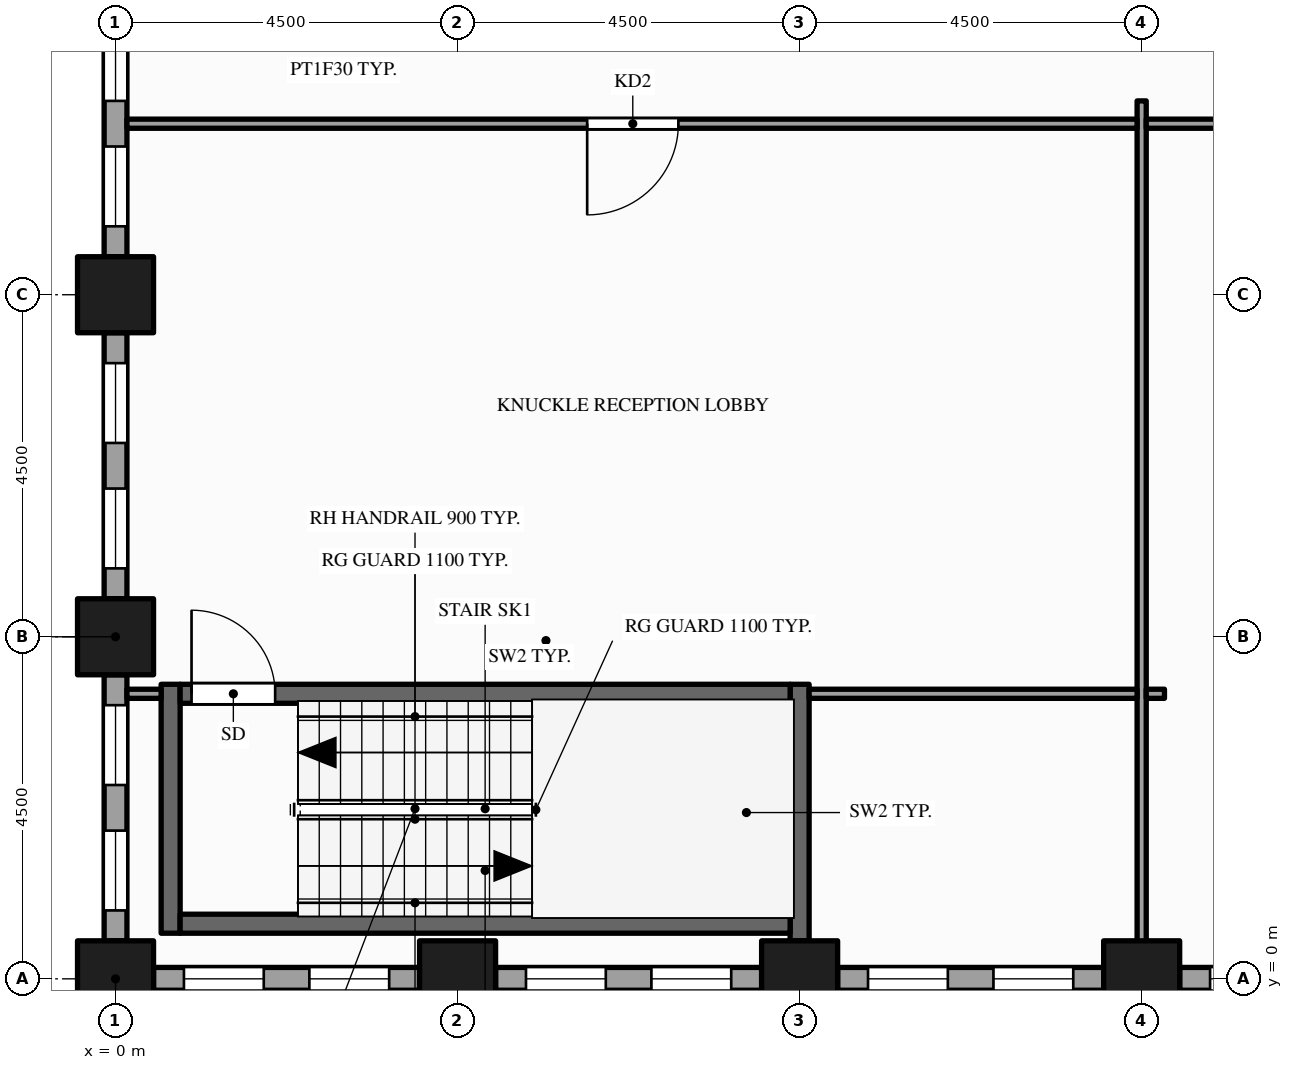
"""IFC4 building model, lengths in metres.
Left out: names, types, materials, properties, quantities, classifications, styles, units other than length and angle.
Written with IfcOpenShell. Run it as: python <this file> out.ifc"""

import sys

from ifc_helpers import new_model, si_unit, direction, frame, frame_2d, origin, origin_2d, place, context, subcontext, project, spatial, rectangle, hollow_rectangle, extrude, element, fill, save


model = new_model("IFC4")
c1 = context("Model", 3, precision=1e-05, world=origin(), true_north=direction((0.0, 1.0)))
c2 = subcontext(c1, "Body", "Model", "MODEL_VIEW")
j1 = project(units=[si_unit("LENGTHUNIT", "METRE"), si_unit("PLANEANGLEUNIT", "RADIAN")], contexts=[c1])
p1 = place(None, origin())
s1 = spatial("IfcSite", under=j1, at=p1, CompositionType="ELEMENT")
p2 = place(p1, origin())
s2 = spatial("IfcBuilding", under=s1, at=p2, CompositionType="ELEMENT")
p3 = place(p2, frame((0.0, 0.0, 127.0)))
s3 = spatial("IfcBuildingStorey", under=s2, at=p3, CompositionType="ELEMENT", Elevation=127.0)
for number, where, z_axis, x_axis in (
    (1, (0.0, 0.0, -0.15), (0.0, 0.0, 1.0), (1.0, 0.0, 0.0)),
    (2, (0.0, 4.5, -0.15), (0.0, 0.0, 1.0), (1.0, 0.0, 0.0)),
    (3, (0.0, 9.0, -0.15), (0.0, 0.0, 1.0), (1.0, 0.0, 0.0)),
    (4, (4.5, 0.0, -0.15), (0.0, 0.0, 1.0), (1.0, 0.0, 0.0)),
    (5, (9.0, 0.0, -0.15), (0.0, 0.0, 1.0), (1.0, 0.0, 0.0)),
    (6, (13.5, 0.0, -0.15), (0.0, 0.0, 1.0), (1.0, 0.0, 0.0)),
):
    element("IfcColumn", number, at=place(p3, frame(where, z_axis=z_axis, x_axis=x_axis)), inside=s3, PredefinedType="COLUMN", context=c2, shape_type="SweptSolid", body=[
        extrude(hollow_rectangle(XDim=1.0, YDim=1.0, WallThickness=0.05, at=origin_2d()), origin(), (0.0, 0.0, 1.0), 3.9),
    ])
p4 = place(p3, frame((0.0, 13.0, 0.0), z_axis=(0.0, 0.0, 1.0), x_axis=(0.0, -1.0, 0.0)))
e7 = element("IfcWall", 7, at=p4, inside=s3, PredefinedType="STANDARD", context=c2, shape_type="SweptSolid", body=[
    extrude(rectangle(XDim=3.5, YDim=0.3, at=frame_2d((1.75, 0.0))), origin(), (0.0, 0.0, 1.0), 3.054),
])
p5 = place(p4, frame((0.4, 0.0, 0.9)))
e8 = element("IfcOpeningElement", 8, at=p5, cuts=e7, PredefinedType="OPENING", context=c2, shape_type="SweptSolid", body=[
    extrude(rectangle(XDim=1.05, YDim=2.0, at=frame_2d((0.525, 1.0))), frame((0.0, 0.16, 0.0), z_axis=(0.0, -1.0, 0.0), x_axis=(1.0, 0.0, 0.0)), (0.0, 0.0, 1.0), 0.32),
])
p6 = place(p4, frame((2.05, 0.0, 0.9)))
e9 = element("IfcOpeningElement", 9, at=p6, cuts=e7, PredefinedType="OPENING", context=c2, shape_type="SweptSolid", body=[
    extrude(rectangle(XDim=1.05, YDim=2.0, at=frame_2d((0.525, 1.0))), frame((0.0, 0.16, 0.0), z_axis=(0.0, -1.0, 0.0), x_axis=(1.0, 0.0, 0.0)), (0.0, 0.0, 1.0), 0.32),
])
p7 = place(p3, frame((0.0, 8.5, 0.0), z_axis=(0.0, 0.0, 1.0), x_axis=(0.0, -1.0, 0.0)))
e10 = element("IfcWall", 10, at=p7, inside=s3, PredefinedType="STANDARD", context=c2, shape_type="SweptSolid", body=[
    extrude(rectangle(XDim=3.5, YDim=0.3, at=frame_2d((1.75, 0.0))), origin(), (0.0, 0.0, 1.0), 3.054),
])
p8 = place(p7, frame((0.4, 0.0, 0.9)))
e11 = element("IfcOpeningElement", 11, at=p8, cuts=e10, PredefinedType="OPENING", context=c2, shape_type="SweptSolid", body=[
    extrude(rectangle(XDim=1.05, YDim=2.0, at=frame_2d((0.525, 1.0))), frame((0.0, 0.16, 0.0), z_axis=(0.0, -1.0, 0.0), x_axis=(1.0, 0.0, 0.0)), (0.0, 0.0, 1.0), 0.32),
])
p9 = place(p7, frame((2.05, 0.0, 0.9)))
e12 = element("IfcOpeningElement", 12, at=p9, cuts=e10, PredefinedType="OPENING", context=c2, shape_type="SweptSolid", body=[
    extrude(rectangle(XDim=1.05, YDim=2.0, at=frame_2d((0.525, 1.0))), frame((0.0, 0.16, 0.0), z_axis=(0.0, -1.0, 0.0), x_axis=(1.0, 0.0, 0.0)), (0.0, 0.0, 1.0), 0.32),
])
p10 = place(p3, frame((0.0, 4.0, 0.0), z_axis=(0.0, 0.0, 1.0), x_axis=(0.0, -1.0, 0.0)))
e13 = element("IfcWall", 13, at=p10, inside=s3, PredefinedType="STANDARD", context=c2, shape_type="SweptSolid", body=[
    extrude(rectangle(XDim=3.5, YDim=0.3, at=frame_2d((1.75, 0.0))), origin(), (0.0, 0.0, 1.0), 3.054),
])
p11 = place(p10, frame((0.4, 0.0, 0.9)))
e14 = element("IfcOpeningElement", 14, at=p11, cuts=e13, PredefinedType="OPENING", context=c2, shape_type="SweptSolid", body=[
    extrude(rectangle(XDim=1.05, YDim=2.0, at=frame_2d((0.525, 1.0))), frame((0.0, 0.16, 0.0), z_axis=(0.0, -1.0, 0.0), x_axis=(1.0, 0.0, 0.0)), (0.0, 0.0, 1.0), 0.32),
])
p12 = place(p10, frame((2.05, 0.0, 0.9)))
e15 = element("IfcOpeningElement", 15, at=p12, cuts=e13, PredefinedType="OPENING", context=c2, shape_type="SweptSolid", body=[
    extrude(rectangle(XDim=1.05, YDim=2.0, at=frame_2d((0.525, 1.0))), frame((0.0, 0.16, 0.0), z_axis=(0.0, -1.0, 0.0), x_axis=(1.0, 0.0, 0.0)), (0.0, 0.0, 1.0), 0.32),
])
p13 = place(p3, frame((0.5, 0.0, 0.0), z_axis=(0.0, 0.0, 1.0), x_axis=(1.0, 0.0, 0.0)))
e16 = element("IfcWall", 16, at=p13, inside=s3, PredefinedType="STANDARD", context=c2, shape_type="SweptSolid", body=[
    extrude(rectangle(XDim=3.5, YDim=0.3, at=frame_2d((1.75, 0.0))), origin(), (0.0, 0.0, 1.0), 3.054),
])
p14 = place(p13, frame((0.4, 0.0, 0.9)))
e17 = element("IfcOpeningElement", 17, at=p14, cuts=e16, PredefinedType="OPENING", context=c2, shape_type="SweptSolid", body=[
    extrude(rectangle(XDim=1.05, YDim=2.0, at=frame_2d((0.525, 1.0))), frame((0.0, 0.16, 0.0), z_axis=(0.0, -1.0, 0.0), x_axis=(1.0, 0.0, 0.0)), (0.0, 0.0, 1.0), 0.32),
])
p15 = place(p13, frame((2.05, 0.0, 0.9)))
e18 = element("IfcOpeningElement", 18, at=p15, cuts=e16, PredefinedType="OPENING", context=c2, shape_type="SweptSolid", body=[
    extrude(rectangle(XDim=1.05, YDim=2.0, at=frame_2d((0.525, 1.0))), frame((0.0, 0.16, 0.0), z_axis=(0.0, -1.0, 0.0), x_axis=(1.0, 0.0, 0.0)), (0.0, 0.0, 1.0), 0.32),
])
p16 = place(p3, frame((5.0, 0.0, 0.0), z_axis=(0.0, 0.0, 1.0), x_axis=(1.0, 0.0, 0.0)))
e19 = element("IfcWall", 19, at=p16, inside=s3, PredefinedType="STANDARD", context=c2, shape_type="SweptSolid", body=[
    extrude(rectangle(XDim=3.5, YDim=0.3, at=frame_2d((1.75, 0.0))), origin(), (0.0, 0.0, 1.0), 3.054),
])
p17 = place(p16, frame((0.4, 0.0, 0.9)))
e20 = element("IfcOpeningElement", 20, at=p17, cuts=e19, PredefinedType="OPENING", context=c2, shape_type="SweptSolid", body=[
    extrude(rectangle(XDim=1.05, YDim=2.0, at=frame_2d((0.525, 1.0))), frame((0.0, 0.16, 0.0), z_axis=(0.0, -1.0, 0.0), x_axis=(1.0, 0.0, 0.0)), (0.0, 0.0, 1.0), 0.32),
])
p18 = place(p16, frame((2.05, 0.0, 0.9)))
e21 = element("IfcOpeningElement", 21, at=p18, cuts=e19, PredefinedType="OPENING", context=c2, shape_type="SweptSolid", body=[
    extrude(rectangle(XDim=1.05, YDim=2.0, at=frame_2d((0.525, 1.0))), frame((0.0, 0.16, 0.0), z_axis=(0.0, -1.0, 0.0), x_axis=(1.0, 0.0, 0.0)), (0.0, 0.0, 1.0), 0.32),
])
p19 = place(p3, frame((9.5, 0.0, 0.0), z_axis=(0.0, 0.0, 1.0), x_axis=(1.0, 0.0, 0.0)))
e22 = element("IfcWall", 22, at=p19, inside=s3, PredefinedType="STANDARD", context=c2, shape_type="SweptSolid", body=[
    extrude(rectangle(XDim=3.5, YDim=0.3, at=frame_2d((1.75, 0.0))), origin(), (0.0, 0.0, 1.0), 3.054),
])
p20 = place(p19, frame((0.4, 0.0, 0.9)))
e23 = element("IfcOpeningElement", 23, at=p20, cuts=e22, PredefinedType="OPENING", context=c2, shape_type="SweptSolid", body=[
    extrude(rectangle(XDim=1.05, YDim=2.0, at=frame_2d((0.525, 1.0))), frame((0.0, 0.16, 0.0), z_axis=(0.0, -1.0, 0.0), x_axis=(1.0, 0.0, 0.0)), (0.0, 0.0, 1.0), 0.32),
])
p21 = place(p19, frame((2.05, 0.0, 0.9)))
e24 = element("IfcOpeningElement", 24, at=p21, cuts=e22, PredefinedType="OPENING", context=c2, shape_type="SweptSolid", body=[
    extrude(rectangle(XDim=1.05, YDim=2.0, at=frame_2d((0.525, 1.0))), frame((0.0, 0.16, 0.0), z_axis=(0.0, -1.0, 0.0), x_axis=(1.0, 0.0, 0.0)), (0.0, 0.0, 1.0), 0.32),
])
p22 = place(p3, frame((14.0, 0.0, 0.0), z_axis=(0.0, 0.0, 1.0), x_axis=(1.0, 0.0, 0.0)))
e25 = element("IfcWall", 25, at=p22, inside=s3, PredefinedType="STANDARD", context=c2, shape_type="SweptSolid", body=[
    extrude(rectangle(XDim=3.5, YDim=0.3, at=frame_2d((1.75, 0.0))), origin(), (0.0, 0.0, 1.0), 3.054),
])
p23 = place(p22, frame((0.4, 0.0, 0.9)))
e26 = element("IfcOpeningElement", 26, at=p23, cuts=e25, PredefinedType="OPENING", context=c2, shape_type="SweptSolid", body=[
    extrude(rectangle(XDim=1.05, YDim=2.0, at=frame_2d((0.525, 1.0))), frame((0.0, 0.16, 0.0), z_axis=(0.0, -1.0, 0.0), x_axis=(1.0, 0.0, 0.0)), (0.0, 0.0, 1.0), 0.32),
])
p24 = place(p22, frame((2.05, 0.0, 0.9)))
e27 = element("IfcOpeningElement", 27, at=p24, cuts=e25, PredefinedType="OPENING", context=c2, shape_type="SweptSolid", body=[
    extrude(rectangle(XDim=1.05, YDim=2.0, at=frame_2d((0.525, 1.0))), frame((0.0, 0.16, 0.0), z_axis=(0.0, -1.0, 0.0), x_axis=(1.0, 0.0, 0.0)), (0.0, 0.0, 1.0), 0.32),
])
p25 = place(p3, frame((0.725, 0.6, 0.0), z_axis=(0.0, 0.0, 1.0), x_axis=(0.0, 1.0, 0.0)))
e28 = element("IfcWall", 28, at=p25, inside=s3, PredefinedType="SHEAR", context=c2, shape_type="SweptSolid", body=[
    extrude(rectangle(XDim=3.275, YDim=0.25, at=frame_2d((1.637, 0.0))), origin(), (0.0, 0.0, 1.0), 3.75),
])
p26 = place(p3, frame((9.0, 0.5, 0.0), z_axis=(0.0, 0.0, 1.0), x_axis=(0.0, 1.0, 0.0)))
e29 = element("IfcWall", 29, at=p26, inside=s3, PredefinedType="SHEAR", context=c2, shape_type="SweptSolid", body=[
    extrude(rectangle(XDim=3.375, YDim=0.25, at=frame_2d((1.688, 0.0))), origin(), (0.0, 0.0, 1.0), 3.75),
])
p27 = place(p3, frame((13.5, 0.15, 0.0), z_axis=(0.0, 0.0, 1.0), x_axis=(0.0, 1.0, 0.0)))
e30 = element("IfcWall", 30, at=p27, inside=s3, PredefinedType="PARTITIONING", context=c2, shape_type="SweptSolid", body=[
    extrude(rectangle(XDim=11.4, YDim=0.12, at=frame_2d((5.7, 0.0))), origin(), (0.0, 0.0, 1.0), 2.838),
])
p28 = place(p3, frame((0.85, 0.725, 0.0), z_axis=(0.0, 0.0, 1.0), x_axis=(1.0, 0.0, 0.0)))
e31 = element("IfcWall", 31, at=p28, inside=s3, PredefinedType="SHEAR", context=c2, shape_type="SweptSolid", body=[
    extrude(rectangle(XDim=8.025, YDim=0.25, at=frame_2d((4.012, 0.0))), origin(), (0.0, 0.0, 1.0), 3.75),
])
p29 = place(p3, frame((0.15, 3.75, 0.0), z_axis=(0.0, 0.0, 1.0), x_axis=(1.0, 0.0, 0.0)))
e32 = element("IfcWall", 32, at=p29, inside=s3, PredefinedType="PARTITIONING", context=c2, shape_type="SweptSolid", body=[
    extrude(rectangle(XDim=0.45, YDim=0.12, at=frame_2d((0.225, 0.0))), origin(), (0.0, 0.0, 1.0), 3.75),
])
p30 = place(p3, frame((0.85, 3.75, 0.0), z_axis=(0.0, 0.0, 1.0), x_axis=(1.0, 0.0, 0.0)))
e33 = element("IfcWall", 33, at=p30, inside=s3, PredefinedType="SHEAR", context=c2, shape_type="SweptSolid", body=[
    extrude(rectangle(XDim=8.025, YDim=0.25, at=frame_2d((4.012, 0.0))), origin(), (0.0, 0.0, 1.0), 3.75),
])
p31 = place(p30, frame((0.15, 0.0, 0.0)))
e34 = element("IfcOpeningElement", 34, at=p31, cuts=e33, PredefinedType="OPENING", context=c2, shape_type="SweptSolid", body=[
    extrude(rectangle(XDim=1.1, YDim=2.1, at=frame_2d((0.55, 1.05))), frame((0.0, 0.135, 0.0), z_axis=(0.0, -1.0, 0.0), x_axis=(1.0, 0.0, 0.0)), (0.0, 0.0, 1.0), 0.27),
])
p32 = place(p3, frame((9.125, 3.75, 0.0), z_axis=(0.0, 0.0, 1.0), x_axis=(1.0, 0.0, 0.0)))
e35 = element("IfcWall", 35, at=p32, inside=s3, PredefinedType="PARTITIONING", context=c2, shape_type="SweptSolid", body=[
    extrude(rectangle(XDim=4.315, YDim=0.12, at=frame_2d((2.157, 0.0))), origin(), (0.0, 0.0, 1.0), 2.838),
])
p33 = place(p3, frame((13.56, 3.75, 0.0), z_axis=(0.0, 0.0, 1.0), x_axis=(1.0, 0.0, 0.0)))
e36 = element("IfcWall", 36, at=p33, inside=s3, PredefinedType="PARTITIONING", context=c2, shape_type="SweptSolid", body=[
    extrude(rectangle(XDim=0.24, YDim=0.12, at=frame_2d((0.12, 0.0))), origin(), (0.0, 0.0, 1.0), 2.838),
])
p34 = place(p3, frame((0.15, 11.25, 0.0), z_axis=(0.0, 0.0, 1.0), x_axis=(1.0, 0.0, 0.0)))
e37 = element("IfcWall", 37, at=p34, inside=s3, PredefinedType="PARTITIONING", context=c2, shape_type="SweptSolid", body=[
    extrude(rectangle(XDim=13.29, YDim=0.12, at=frame_2d((6.645, 0.0))), origin(), (0.0, 0.0, 1.0), 2.838),
])
p35 = place(p34, frame((6.055, 0.0, 0.0)))
e38 = element("IfcOpeningElement", 38, at=p35, cuts=e37, PredefinedType="OPENING", context=c2, shape_type="SweptSolid", body=[
    extrude(rectangle(XDim=1.2, YDim=2.1, at=frame_2d((0.6, 1.05))), frame((0.0, 0.07, 0.0), z_axis=(0.0, -1.0, 0.0), x_axis=(1.0, 0.0, 0.0)), (0.0, 0.0, 1.0), 0.14),
])
p36 = place(p3, frame((13.56, 11.25, 0.0), z_axis=(0.0, 0.0, 1.0), x_axis=(1.0, 0.0, 0.0)))
e39 = element("IfcWall", 39, at=p36, inside=s3, PredefinedType="PARTITIONING", context=c2, shape_type="SweptSolid", body=[
    extrude(rectangle(XDim=6.63, YDim=0.12, at=frame_2d((3.315, 0.0))), origin(), (0.0, 0.0, 1.0), 2.838),
])
p37 = place(p36, frame((2.815, 0.0, 0.0)))
e40 = element("IfcOpeningElement", 40, at=p37, cuts=e39, PredefinedType="OPENING", context=c2, shape_type="SweptSolid", body=[
    extrude(rectangle(XDim=1.0, YDim=2.1, at=frame_2d((0.5, 1.05))), frame((0.0, 0.07, 0.0), z_axis=(0.0, -1.0, 0.0), x_axis=(1.0, 0.0, 0.0)), (0.0, 0.0, 1.0), 0.14),
])
p38 = place(p5, origin())
e41 = element("IfcWindow", 41, at=p38, inside=s3, PartitioningType="SINGLE_PANEL", PredefinedType="WINDOW", context=c2, shape_type="SweptSolid", body=[
    extrude(rectangle(XDim=1.05, YDim=2.0, at=frame_2d((0.525, 1.0))), frame((0.0, 0.03, 0.0), z_axis=(0.0, -1.0, 0.0), x_axis=(1.0, 0.0, 0.0)), (0.0, 0.0, 1.0), 0.06),
])
fill(e8, e41)
p39 = place(p6, origin())
e42 = element("IfcWindow", 42, at=p39, inside=s3, PartitioningType="SINGLE_PANEL", PredefinedType="WINDOW", context=c2, shape_type="SweptSolid", body=[
    extrude(rectangle(XDim=1.05, YDim=2.0, at=frame_2d((0.525, 1.0))), frame((0.0, 0.03, 0.0), z_axis=(0.0, -1.0, 0.0), x_axis=(1.0, 0.0, 0.0)), (0.0, 0.0, 1.0), 0.06),
])
fill(e9, e42)
p40 = place(p8, origin())
e43 = element("IfcWindow", 43, at=p40, inside=s3, PartitioningType="SINGLE_PANEL", PredefinedType="WINDOW", context=c2, shape_type="SweptSolid", body=[
    extrude(rectangle(XDim=1.05, YDim=2.0, at=frame_2d((0.525, 1.0))), frame((0.0, 0.03, 0.0), z_axis=(0.0, -1.0, 0.0), x_axis=(1.0, 0.0, 0.0)), (0.0, 0.0, 1.0), 0.06),
])
fill(e11, e43)
p41 = place(p9, origin())
e44 = element("IfcWindow", 44, at=p41, inside=s3, PartitioningType="SINGLE_PANEL", PredefinedType="WINDOW", context=c2, shape_type="SweptSolid", body=[
    extrude(rectangle(XDim=1.05, YDim=2.0, at=frame_2d((0.525, 1.0))), frame((0.0, 0.03, 0.0), z_axis=(0.0, -1.0, 0.0), x_axis=(1.0, 0.0, 0.0)), (0.0, 0.0, 1.0), 0.06),
])
fill(e12, e44)
p42 = place(p11, origin())
e45 = element("IfcWindow", 45, at=p42, inside=s3, PartitioningType="SINGLE_PANEL", PredefinedType="WINDOW", context=c2, shape_type="SweptSolid", body=[
    extrude(rectangle(XDim=1.05, YDim=2.0, at=frame_2d((0.525, 1.0))), frame((0.0, 0.03, 0.0), z_axis=(0.0, -1.0, 0.0), x_axis=(1.0, 0.0, 0.0)), (0.0, 0.0, 1.0), 0.06),
])
fill(e14, e45)
p43 = place(p12, origin())
e46 = element("IfcWindow", 46, at=p43, inside=s3, PartitioningType="SINGLE_PANEL", PredefinedType="WINDOW", context=c2, shape_type="SweptSolid", body=[
    extrude(rectangle(XDim=1.05, YDim=2.0, at=frame_2d((0.525, 1.0))), frame((0.0, 0.03, 0.0), z_axis=(0.0, -1.0, 0.0), x_axis=(1.0, 0.0, 0.0)), (0.0, 0.0, 1.0), 0.06),
])
fill(e15, e46)
p44 = place(p14, origin())
e47 = element("IfcWindow", 47, at=p44, inside=s3, PartitioningType="SINGLE_PANEL", PredefinedType="WINDOW", context=c2, shape_type="SweptSolid", body=[
    extrude(rectangle(XDim=1.05, YDim=2.0, at=frame_2d((0.525, 1.0))), frame((0.0, 0.03, 0.0), z_axis=(0.0, -1.0, 0.0), x_axis=(1.0, 0.0, 0.0)), (0.0, 0.0, 1.0), 0.06),
])
fill(e17, e47)
p45 = place(p15, origin())
e48 = element("IfcWindow", 48, at=p45, inside=s3, PartitioningType="SINGLE_PANEL", PredefinedType="WINDOW", context=c2, shape_type="SweptSolid", body=[
    extrude(rectangle(XDim=1.05, YDim=2.0, at=frame_2d((0.525, 1.0))), frame((0.0, 0.03, 0.0), z_axis=(0.0, -1.0, 0.0), x_axis=(1.0, 0.0, 0.0)), (0.0, 0.0, 1.0), 0.06),
])
fill(e18, e48)
p46 = place(p17, origin())
e49 = element("IfcWindow", 49, at=p46, inside=s3, PartitioningType="SINGLE_PANEL", PredefinedType="WINDOW", context=c2, shape_type="SweptSolid", body=[
    extrude(rectangle(XDim=1.05, YDim=2.0, at=frame_2d((0.525, 1.0))), frame((0.0, 0.03, 0.0), z_axis=(0.0, -1.0, 0.0), x_axis=(1.0, 0.0, 0.0)), (0.0, 0.0, 1.0), 0.06),
])
fill(e20, e49)
p47 = place(p18, origin())
e50 = element("IfcWindow", 50, at=p47, inside=s3, PartitioningType="SINGLE_PANEL", PredefinedType="WINDOW", context=c2, shape_type="SweptSolid", body=[
    extrude(rectangle(XDim=1.05, YDim=2.0, at=frame_2d((0.525, 1.0))), frame((0.0, 0.03, 0.0), z_axis=(0.0, -1.0, 0.0), x_axis=(1.0, 0.0, 0.0)), (0.0, 0.0, 1.0), 0.06),
])
fill(e21, e50)
p48 = place(p20, origin())
e51 = element("IfcWindow", 51, at=p48, inside=s3, PartitioningType="SINGLE_PANEL", PredefinedType="WINDOW", context=c2, shape_type="SweptSolid", body=[
    extrude(rectangle(XDim=1.05, YDim=2.0, at=frame_2d((0.525, 1.0))), frame((0.0, 0.03, 0.0), z_axis=(0.0, -1.0, 0.0), x_axis=(1.0, 0.0, 0.0)), (0.0, 0.0, 1.0), 0.06),
])
fill(e23, e51)
p49 = place(p21, origin())
e52 = element("IfcWindow", 52, at=p49, inside=s3, PartitioningType="SINGLE_PANEL", PredefinedType="WINDOW", context=c2, shape_type="SweptSolid", body=[
    extrude(rectangle(XDim=1.05, YDim=2.0, at=frame_2d((0.525, 1.0))), frame((0.0, 0.03, 0.0), z_axis=(0.0, -1.0, 0.0), x_axis=(1.0, 0.0, 0.0)), (0.0, 0.0, 1.0), 0.06),
])
fill(e24, e52)
p50 = place(p23, origin())
e53 = element("IfcWindow", 53, at=p50, inside=s3, PartitioningType="SINGLE_PANEL", PredefinedType="WINDOW", context=c2, shape_type="SweptSolid", body=[
    extrude(rectangle(XDim=1.05, YDim=2.0, at=frame_2d((0.525, 1.0))), frame((0.0, 0.03, 0.0), z_axis=(0.0, -1.0, 0.0), x_axis=(1.0, 0.0, 0.0)), (0.0, 0.0, 1.0), 0.06),
])
fill(e26, e53)
p51 = place(p31, origin())
e54 = element("IfcDoor", 54, at=p51, inside=s3, OperationType="SINGLE_SWING_LEFT", PredefinedType="DOOR", context=c2, shape_type="SweptSolid", body=[
    extrude(rectangle(XDim=1.1, YDim=2.1, at=frame_2d((0.55, 1.05))), frame((0.0, 0.025, 0.0), z_axis=(0.0, -1.0, 0.0), x_axis=(1.0, 0.0, 0.0)), (0.0, 0.0, 1.0), 0.05),
])
fill(e34, e54)
p52 = place(p35, origin())
e55 = element("IfcDoor", 55, at=p52, inside=s3, OperationType="SINGLE_SWING_LEFT", PredefinedType="DOOR", context=c2, shape_type="SweptSolid", body=[
    extrude(rectangle(XDim=1.2, YDim=2.1, at=frame_2d((0.6, 1.05))), frame((0.0, 0.025, 0.0), z_axis=(0.0, -1.0, 0.0), x_axis=(1.0, 0.0, 0.0)), (0.0, 0.0, 1.0), 0.05),
])
fill(e38, e55)
save(model, sys.argv[1])
